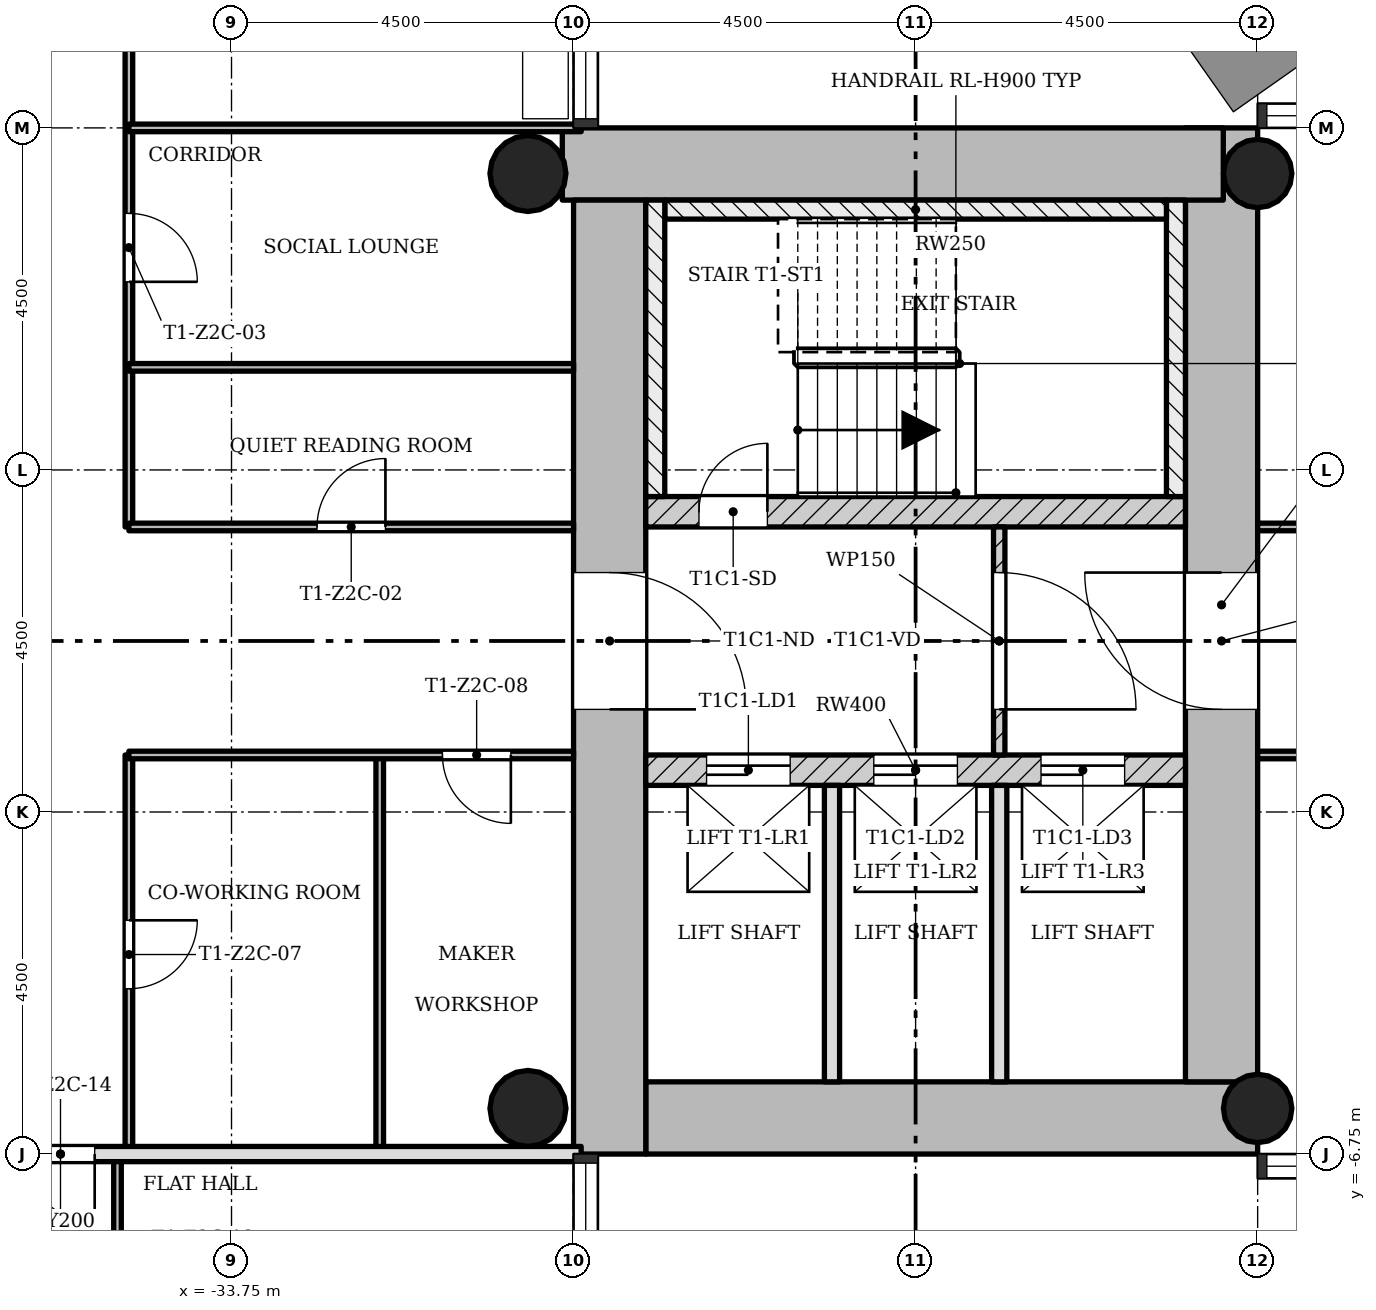
"""IFC4 building model, lengths in metres.
Left out: names, types, materials, properties, quantities, classifications, styles, units other than length and angle.
Written with IfcOpenShell. Run it as: python <this file> out.ifc"""

import sys

from ifc_helpers import new_model, si_unit, direction, frame, frame_2d, origin, origin_2d, place, context, subcontext, project, spatial, rectangle, hollow_circle, extrude, element, fill, save


model = new_model("IFC4")
c1 = context("Model", 3, precision=1e-05, world=origin(), true_north=direction((0.0, 1.0)))
c2 = subcontext(c1, "Body", "Model", "MODEL_VIEW")
j1 = project(units=[si_unit("LENGTHUNIT", "METRE"), si_unit("PLANEANGLEUNIT", "RADIAN")], contexts=[c1])
p1 = place(None, origin())
s1 = spatial("IfcSite", under=j1, at=p1, CompositionType="ELEMENT")
p2 = place(p1, origin())
s2 = spatial("IfcBuilding", under=s1, at=p2, CompositionType="ELEMENT")
p3 = place(p2, frame((0.0, 0.0, 86.8)))
s3 = spatial("IfcBuildingStorey", under=s2, at=p3, CompositionType="ELEMENT", Elevation=86.8)
p4 = place(p3, frame((-28.3, -6.275, 0.0), z_axis=(0.0, 0.0, 1.0), x_axis=(1.0, 0.0, 0.0)))
e1 = element("IfcWall", 1, at=p4, inside=s3, PredefinedType="SHEAR", context=c2, shape_type="SweptSolid", body=[
    extrude(rectangle(XDim=8.05, YDim=0.95, at=frame_2d((4.025, 0.0))), origin(), (0.0, 0.0, 1.0), 3.4),
])
p5 = place(p3, frame((-20.725, -5.8, 0.0), z_axis=(0.0, 0.0, 1.0), x_axis=(0.0, 1.0, 0.0)))
e2 = element("IfcWall", 2, at=p5, inside=s3, PredefinedType="SHEAR", context=c2, shape_type="SweptSolid", body=[
    extrude(rectangle(XDim=12.55, YDim=0.95, at=frame_2d((6.275, 0.0))), origin(), (0.0, 0.0, 1.0), 3.4),
])
p6 = place(p5, frame((4.9, 0.0, 0.0)))
e3 = element("IfcOpeningElement", 3, at=p6, cuts=e2, PredefinedType="OPENING", context=c2, shape_type="SweptSolid", body=[
    extrude(rectangle(XDim=1.8, YDim=2.1, at=frame_2d((0.9, 1.05))), frame((0.0, 0.485, 0.0), z_axis=(0.0, -1.0, 0.0), x_axis=(1.0, 0.0, 0.0)), (0.0, 0.0, 1.0), 0.97),
])
p7 = place(p3, frame((-20.702, 6.275, 0.0), z_axis=(0.0, 0.0, 1.0), x_axis=(-1.0, 0.0, 0.0)))
e4 = element("IfcWall", 4, at=p7, inside=s3, PredefinedType="SHEAR", context=c2, shape_type="SweptSolid", body=[
    extrude(rectangle(XDim=8.696, YDim=0.95, at=frame_2d((4.348, 0.0))), origin(), (0.0, 0.0, 1.0), 3.4),
])
p8 = place(p3, frame((-28.775, 5.8, 0.0), z_axis=(0.0, 0.0, 1.0), x_axis=(0.0, -1.0, 0.0)))
e5 = element("IfcWall", 5, at=p8, inside=s3, PredefinedType="SHEAR", context=c2, shape_type="SweptSolid", body=[
    extrude(rectangle(XDim=12.55, YDim=0.95, at=frame_2d((6.275, 0.0))), origin(), (0.0, 0.0, 1.0), 3.4),
])
p9 = place(p8, frame((4.9, 0.0, 0.0)))
e6 = element("IfcOpeningElement", 6, at=p9, cuts=e5, PredefinedType="OPENING", context=c2, shape_type="SweptSolid", body=[
    extrude(rectangle(XDim=1.8, YDim=2.1, at=frame_2d((0.9, 1.05))), frame((0.0, 0.485, 0.0), z_axis=(0.0, -1.0, 0.0), x_axis=(1.0, 0.0, 0.0)), (0.0, 0.0, 1.0), 0.97),
])
p10 = place(p3, frame((-28.3, -1.7, 0.0), z_axis=(0.0, 0.0, 1.0), x_axis=(1.0, 0.0, 0.0)))
e7 = element("IfcWall", 7, at=p10, inside=s3, PredefinedType="SHEAR", context=c2, shape_type="SweptSolid", body=[
    extrude(rectangle(XDim=7.1, YDim=0.4, at=frame_2d((3.55, 0.0))), origin(), (0.0, 0.0, 1.0), 3.4),
])
p11 = place(p10, frame((0.8, 0.0, 0.0)))
e8 = element("IfcOpeningElement", 8, at=p11, cuts=e7, PredefinedType="OPENING", context=c2, shape_type="SweptSolid", body=[
    extrude(rectangle(XDim=1.1, YDim=2.1, at=frame_2d((0.55, 1.05))), frame((0.0, 0.21, 0.0), z_axis=(0.0, -1.0, 0.0), x_axis=(1.0, 0.0, 0.0)), (0.0, 0.0, 1.0), 0.42),
])
p12 = place(p10, frame((3.0, 0.0, 0.0)))
e9 = element("IfcOpeningElement", 9, at=p12, cuts=e7, PredefinedType="OPENING", context=c2, shape_type="SweptSolid", body=[
    extrude(rectangle(XDim=1.1, YDim=2.1, at=frame_2d((0.55, 1.05))), frame((0.0, 0.21, 0.0), z_axis=(0.0, -1.0, 0.0), x_axis=(1.0, 0.0, 0.0)), (0.0, 0.0, 1.0), 0.42),
])
p13 = place(p10, frame((5.2, 0.0, 0.0)))
e10 = element("IfcOpeningElement", 10, at=p13, cuts=e7, PredefinedType="OPENING", context=c2, shape_type="SweptSolid", body=[
    extrude(rectangle(XDim=1.1, YDim=2.1, at=frame_2d((0.55, 1.05))), frame((0.0, 0.21, 0.0), z_axis=(0.0, -1.0, 0.0), x_axis=(1.0, 0.0, 0.0)), (0.0, 0.0, 1.0), 0.42),
])
p14 = place(p3, frame((-28.3, 1.7, 0.0), z_axis=(0.0, 0.0, 1.0), x_axis=(1.0, 0.0, 0.0)))
e11 = element("IfcWall", 11, at=p14, inside=s3, PredefinedType="SHEAR", context=c2, shape_type="SweptSolid", body=[
    extrude(rectangle(XDim=7.1, YDim=0.4, at=frame_2d((3.55, 0.0))), origin(), (0.0, 0.0, 1.0), 3.4),
])
p15 = place(p14, frame((0.7, 0.0, 0.0)))
e12 = element("IfcOpeningElement", 12, at=p15, cuts=e11, PredefinedType="OPENING", context=c2, shape_type="SweptSolid", body=[
    extrude(rectangle(XDim=0.9, YDim=2.1, at=frame_2d((0.45, 1.05))), frame((0.0, 0.21, 0.0), z_axis=(0.0, -1.0, 0.0), x_axis=(1.0, 0.0, 0.0)), (0.0, 0.0, 1.0), 0.42),
])
for number, where, z_axis, x_axis in (
    (13, (-20.25, -6.15, 0.0), (0.0, 0.0, 1.0), (1.0, 0.0, 0.0)),
    (14, (-20.25, 6.15, 0.0), (0.0, 0.0, 1.0), (1.0, 0.0, 0.0)),
):
    element("IfcColumn", number, at=place(p3, frame(where, z_axis=z_axis, x_axis=x_axis)), inside=s3, PredefinedType="COLUMN", context=c2, shape_type="SweptSolid", body=[
        extrude(hollow_circle(Radius=0.45, WallThickness=0.032, at=origin_2d()), origin(), (0.0, 0.0, 1.0), 3.4),
    ])
for number, where, z_axis, x_axis in (
    (15, (-29.85, -6.15, 0.0), (0.0, 0.0, 1.0), (1.0, 0.0, 0.0)),
    (16, (-29.85, 6.15, 0.0), (0.0, 0.0, 1.0), (1.0, 0.0, 0.0)),
):
    element("IfcColumn", number, at=place(p3, frame(where, z_axis=z_axis, x_axis=x_axis)), inside=s3, PredefinedType="COLUMN", context=c2, shape_type="SweptSolid", body=[
        extrude(hollow_circle(Radius=0.5, WallThickness=0.036, at=origin_2d()), origin(), (0.0, 0.0, 1.0), 3.4),
    ])
p16 = place(p3, frame((-23.65, -1.5, 0.0), z_axis=(0.0, 0.0, 1.0), x_axis=(0.0, 1.0, 0.0)))
e17 = element("IfcWall", 17, at=p16, inside=s3, PredefinedType="PARTITIONING", context=c2, shape_type="SweptSolid", body=[
    extrude(rectangle(XDim=3.0, YDim=0.15, at=frame_2d((1.5, 0.0))), origin(), (0.0, 0.0, 1.0), 3.0),
])
p17 = place(p16, frame((0.6, 0.0, 0.0)))
e18 = element("IfcOpeningElement", 18, at=p17, cuts=e17, PredefinedType="OPENING", context=c2, shape_type="SweptSolid", body=[
    extrude(rectangle(XDim=1.8, YDim=2.1, at=frame_2d((0.9, 1.05))), frame((0.0, 0.085, 0.0), z_axis=(0.0, -1.0, 0.0), x_axis=(1.0, 0.0, 0.0)), (0.0, 0.0, 1.0), 0.17),
])
for number, where, z_axis, x_axis in (
    (19, (-25.85, -5.8, 0.0), (0.0, 0.0, 1.0), (0.0, 1.0, 0.0)),
    (20, (-23.65, -5.8, 0.0), (0.0, 0.0, 1.0), (0.0, 1.0, 0.0)),
):
    element("IfcWall", number, at=place(p3, frame(where, z_axis=z_axis, x_axis=x_axis)), inside=s3, PredefinedType="SOLIDWALL", context=c2, shape_type="SweptSolid", body=[
        extrude(rectangle(XDim=3.9, YDim=0.2, at=frame_2d((1.95, 0.0))), origin(), (0.0, 0.0, 1.0), 3.0),
    ])
p18 = place(p3, frame((-35.25, -11.25, 0.0), z_axis=(0.0, 0.0, 1.0), x_axis=(0.0, 1.0, 0.0)))
e21 = element("IfcWall", 21, at=p18, inside=s3, PredefinedType="PARTITIONING", context=c2, shape_type="SweptSolid", body=[
    extrude(rectangle(XDim=4.5, YDim=0.1, at=frame_2d((2.25, 0.0))), origin(), (0.0, 0.0, 1.0), 3.0),
])
p19 = place(p18, frame((1.8, 0.0, 0.0)))
e22 = element("IfcOpeningElement", 22, at=p19, cuts=e21, PredefinedType="OPENING", context=c2, shape_type="SweptSolid", body=[
    extrude(rectangle(XDim=0.9, YDim=2.1, at=frame_2d((0.45, 1.05))), frame((0.0, 0.06, 0.0), z_axis=(0.0, -1.0, 0.0), x_axis=(1.0, 0.0, 0.0)), (0.0, 0.0, 1.0), 0.12),
])
p20 = place(p3, frame((-35.1, -6.75, 0.0), z_axis=(0.0, 0.0, 1.0), x_axis=(0.0, 1.0, 0.0)))
e23 = element("IfcWall", 23, at=p20, inside=s3, PredefinedType="PARTITIONING", context=c2, shape_type="SweptSolid", body=[
    extrude(rectangle(XDim=5.25, YDim=0.1, at=frame_2d((2.625, 0.0))), origin(), (0.0, 0.0, 1.0), 3.0),
])
p21 = place(p20, frame((2.175, 0.0, 0.0)))
e24 = element("IfcOpeningElement", 24, at=p21, cuts=e23, PredefinedType="OPENING", context=c2, shape_type="SweptSolid", body=[
    extrude(rectangle(XDim=0.9, YDim=2.1, at=frame_2d((0.45, 1.05))), frame((0.0, 0.06, 0.0), z_axis=(0.0, -1.0, 0.0), x_axis=(1.0, 0.0, 0.0)), (0.0, 0.0, 1.0), 0.12),
])
p22 = place(p3, frame((-35.1, 1.5, 0.0), z_axis=(0.0, 0.0, 1.0), x_axis=(0.0, 1.0, 0.0)))
e25 = element("IfcWall", 25, at=p22, inside=s3, PredefinedType="PARTITIONING", context=c2, shape_type="SweptSolid", body=[
    extrude(rectangle(XDim=9.75, YDim=0.1, at=frame_2d((4.875, 0.0))), origin(), (0.0, 0.0, 1.0), 3.0),
])
p23 = place(p22, frame((3.225, 0.0, 0.0)))
e26 = element("IfcOpeningElement", 26, at=p23, cuts=e25, PredefinedType="OPENING", context=c2, shape_type="SweptSolid", body=[
    extrude(rectangle(XDim=0.9, YDim=2.1, at=frame_2d((0.45, 1.05))), frame((0.0, 0.06, 0.0), z_axis=(0.0, -1.0, 0.0), x_axis=(1.0, 0.0, 0.0)), (0.0, 0.0, 1.0), 0.12),
])
p24 = place(p22, frame((7.05, 0.0, 0.0)))
e27 = element("IfcOpeningElement", 27, at=p24, cuts=e25, PredefinedType="OPENING", context=c2, shape_type="SweptSolid", body=[
    extrude(rectangle(XDim=0.9, YDim=2.1, at=frame_2d((0.45, 1.05))), frame((0.0, 0.06, 0.0), z_axis=(0.0, -1.0, 0.0), x_axis=(1.0, 0.0, 0.0)), (0.0, 0.0, 1.0), 0.12),
])
p25 = place(p3, frame((-31.8, -6.75, 0.0), z_axis=(0.0, 0.0, 1.0), x_axis=(0.0, 1.0, 0.0)))
e28 = element("IfcWall", 28, at=p25, inside=s3, PredefinedType="PARTITIONING", context=c2, shape_type="SweptSolid", body=[
    extrude(rectangle(XDim=5.25, YDim=0.1, at=frame_2d((2.625, 0.0))), origin(), (0.0, 0.0, 1.0), 3.0),
])
p26 = place(p3, frame((-42.85, -6.75, 0.0), z_axis=(0.0, 0.0, 1.0), x_axis=(1.0, 0.0, 0.0)))
e29 = element("IfcWall", 29, at=p26, inside=s3, PredefinedType="SOLIDWALL", context=c2, shape_type="SweptSolid", body=[
    extrude(rectangle(XDim=13.7, YDim=0.2, at=frame_2d((6.85, 0.0))), origin(), (0.0, 0.0, 1.0), 3.0),
])
p27 = place(p26, frame((6.4, 0.0, 0.0)))
e30 = element("IfcOpeningElement", 30, at=p27, cuts=e29, PredefinedType="OPENING", context=c2, shape_type="SweptSolid", body=[
    extrude(rectangle(XDim=0.9, YDim=2.1, at=frame_2d((0.45, 1.05))), frame((0.0, 0.11, 0.0), z_axis=(0.0, -1.0, 0.0), x_axis=(1.0, 0.0, 0.0)), (0.0, 0.0, 1.0), 0.22),
])
p28 = place(p3, frame((-35.1, -1.5, 0.0), z_axis=(0.0, 0.0, 1.0), x_axis=(1.0, 0.0, 0.0)))
e31 = element("IfcWall", 31, at=p28, inside=s3, PredefinedType="PARTITIONING", context=c2, shape_type="SweptSolid", body=[
    extrude(rectangle(XDim=5.85, YDim=0.1, at=frame_2d((2.925, 0.0))), origin(), (0.0, 0.0, 1.0), 3.0),
])
p29 = place(p28, frame((4.125, 0.0, 0.0)))
e32 = element("IfcOpeningElement", 32, at=p29, cuts=e31, PredefinedType="OPENING", context=c2, shape_type="SweptSolid", body=[
    extrude(rectangle(XDim=0.9, YDim=2.1, at=frame_2d((0.45, 1.05))), frame((0.0, 0.06, 0.0), z_axis=(0.0, -1.0, 0.0), x_axis=(1.0, 0.0, 0.0)), (0.0, 0.0, 1.0), 0.12),
])
p30 = place(p3, frame((-20.25, -1.5, 0.0), z_axis=(0.0, 0.0, 1.0), x_axis=(1.0, 0.0, 0.0)))
e33 = element("IfcWall", 33, at=p30, inside=s3, PredefinedType="PARTITIONING", context=c2, shape_type="SweptSolid", body=[
    extrude(rectangle(XDim=4.5, YDim=0.1, at=frame_2d((2.25, 0.0))), origin(), (0.0, 0.0, 1.0), 3.0),
])
p31 = place(p30, frame((1.8, 0.0, 0.0)))
e34 = element("IfcOpeningElement", 34, at=p31, cuts=e33, PredefinedType="OPENING", context=c2, shape_type="SweptSolid", body=[
    extrude(rectangle(XDim=0.9, YDim=2.1, at=frame_2d((0.45, 1.05))), frame((0.0, 0.06, 0.0), z_axis=(0.0, -1.0, 0.0), x_axis=(1.0, 0.0, 0.0)), (0.0, 0.0, 1.0), 0.12),
])
p32 = place(p3, frame((-35.1, 1.5, 0.0), z_axis=(0.0, 0.0, 1.0), x_axis=(1.0, 0.0, 0.0)))
e35 = element("IfcWall", 35, at=p32, inside=s3, PredefinedType="PARTITIONING", context=c2, shape_type="SweptSolid", body=[
    extrude(rectangle(XDim=5.85, YDim=0.1, at=frame_2d((2.925, 0.0))), origin(), (0.0, 0.0, 1.0), 3.0),
])
p33 = place(p32, frame((2.475, 0.0, 0.0)))
e36 = element("IfcOpeningElement", 36, at=p33, cuts=e35, PredefinedType="OPENING", context=c2, shape_type="SweptSolid", body=[
    extrude(rectangle(XDim=0.9, YDim=2.1, at=frame_2d((0.45, 1.05))), frame((0.0, 0.06, 0.0), z_axis=(0.0, -1.0, 0.0), x_axis=(1.0, 0.0, 0.0)), (0.0, 0.0, 1.0), 0.12),
])
p34 = place(p3, frame((-20.25, 1.5, 0.0), z_axis=(0.0, 0.0, 1.0), x_axis=(1.0, 0.0, 0.0)))
e37 = element("IfcWall", 37, at=p34, inside=s3, PredefinedType="PARTITIONING", context=c2, shape_type="SweptSolid", body=[
    extrude(rectangle(XDim=4.5, YDim=0.1, at=frame_2d((2.25, 0.0))), origin(), (0.0, 0.0, 1.0), 3.0),
])
p35 = place(p34, frame((1.8, 0.0, 0.0)))
e38 = element("IfcOpeningElement", 38, at=p35, cuts=e37, PredefinedType="OPENING", context=c2, shape_type="SweptSolid", body=[
    extrude(rectangle(XDim=0.9, YDim=2.1, at=frame_2d((0.45, 1.05))), frame((0.0, 0.06, 0.0), z_axis=(0.0, -1.0, 0.0), x_axis=(1.0, 0.0, 0.0)), (0.0, 0.0, 1.0), 0.12),
])
p36 = place(p3, frame((-35.1, 3.6, 0.0), z_axis=(0.0, 0.0, 1.0), x_axis=(1.0, 0.0, 0.0)))
e39 = element("IfcWall", 39, at=p36, inside=s3, PredefinedType="PARTITIONING", context=c2, shape_type="SweptSolid", body=[
    extrude(rectangle(XDim=5.85, YDim=0.1, at=frame_2d((2.925, 0.0))), origin(), (0.0, 0.0, 1.0), 3.0),
])
p37 = place(p3, frame((-35.1, 6.75, 0.0), z_axis=(0.0, 0.0, 1.0), x_axis=(1.0, 0.0, 0.0)))
e40 = element("IfcWall", 40, at=p37, inside=s3, PredefinedType="PARTITIONING", context=c2, shape_type="SweptSolid", body=[
    extrude(rectangle(XDim=5.95, YDim=0.1, at=frame_2d((2.975, 0.0))), origin(), (0.0, 0.0, 1.0), 3.0),
])
p38 = place(p3, frame((-21.325, 1.9, 0.0), z_axis=(0.0, 0.0, 1.0), x_axis=(0.0, 1.0, 0.0)))
e41 = element("IfcWall", 41, at=p38, inside=s3, PredefinedType="SHEAR", context=c2, shape_type="SweptSolid", body=[
    extrude(rectangle(XDim=3.9, YDim=0.25, at=frame_2d((1.95, 0.0))), origin(), (0.0, 0.0, 1.0), 3.4),
])
p39 = place(p3, frame((-28.05, 5.675, 0.0), z_axis=(0.0, 0.0, 1.0), x_axis=(1.0, 0.0, 0.0)))
e42 = element("IfcWall", 42, at=p39, inside=s3, PredefinedType="SHEAR", context=c2, shape_type="SweptSolid", body=[
    extrude(rectangle(XDim=6.6, YDim=0.25, at=frame_2d((3.3, 0.0))), origin(), (0.0, 0.0, 1.0), 3.4),
])
p40 = place(p3, frame((-28.175, 1.9, 0.0), z_axis=(0.0, 0.0, 1.0), x_axis=(0.0, 1.0, 0.0)))
e43 = element("IfcWall", 43, at=p40, inside=s3, PredefinedType="SHEAR", context=c2, shape_type="SweptSolid", body=[
    extrude(rectangle(XDim=3.9, YDim=0.25, at=frame_2d((1.95, 0.0))), origin(), (0.0, 0.0, 1.0), 3.4),
])
p41 = place(p17, origin())
e44 = element("IfcDoor", 44, at=p41, inside=s3, OperationType="SINGLE_SWING_LEFT", PredefinedType="DOOR", context=c2, shape_type="SweptSolid", body=[
    extrude(rectangle(XDim=1.8, YDim=2.1, at=frame_2d((0.9, 1.05))), frame((0.0, 0.025, 0.0), z_axis=(0.0, -1.0, 0.0), x_axis=(1.0, 0.0, 0.0)), (0.0, 0.0, 1.0), 0.05),
])
fill(e18, e44)
p42 = place(p33, origin())
e45 = element("IfcDoor", 45, at=p42, inside=s3, OperationType="SINGLE_SWING_LEFT", PredefinedType="DOOR", context=c2, shape_type="SweptSolid", body=[
    extrude(rectangle(XDim=0.9, YDim=2.1, at=frame_2d((0.45, 1.05))), frame((0.0, 0.025, 0.0), z_axis=(0.0, -1.0, 0.0), x_axis=(1.0, 0.0, 0.0)), (0.0, 0.0, 1.0), 0.05),
])
fill(e36, e45)
p43 = place(p23, origin())
e46 = element("IfcDoor", 46, at=p43, inside=s3, OperationType="SINGLE_SWING_LEFT", PredefinedType="DOOR", context=c2, shape_type="SweptSolid", body=[
    extrude(rectangle(XDim=0.9, YDim=2.1, at=frame_2d((0.45, 1.05))), frame((0.0, 0.025, 0.0), z_axis=(0.0, -1.0, 0.0), x_axis=(1.0, 0.0, 0.0)), (0.0, 0.0, 1.0), 0.05),
])
fill(e26, e46)
p44 = place(p21, origin())
e47 = element("IfcDoor", 47, at=p44, inside=s3, OperationType="SINGLE_SWING_RIGHT", PredefinedType="DOOR", context=c2, shape_type="SweptSolid", body=[
    extrude(rectangle(XDim=0.9, YDim=2.1, at=frame_2d((0.45, 1.05))), frame((0.0, 0.025, 0.0), z_axis=(0.0, -1.0, 0.0), x_axis=(1.0, 0.0, 0.0)), (0.0, 0.0, 1.0), 0.05),
])
fill(e24, e47)
p45 = place(p29, origin())
e48 = element("IfcDoor", 48, at=p45, inside=s3, OperationType="SINGLE_SWING_RIGHT", PredefinedType="DOOR", context=c2, shape_type="SweptSolid", body=[
    extrude(rectangle(XDim=0.9, YDim=2.1, at=frame_2d((0.45, 1.05))), frame((0.0, 0.025, 0.0), z_axis=(0.0, -1.0, 0.0), x_axis=(1.0, 0.0, 0.0)), (0.0, 0.0, 1.0), 0.05),
])
fill(e32, e48)
p46 = place(p27, origin())
e49 = element("IfcDoor", 49, at=p46, inside=s3, OperationType="SINGLE_SWING_RIGHT", PredefinedType="DOOR", context=c2, shape_type="SweptSolid", body=[
    extrude(rectangle(XDim=0.9, YDim=2.1, at=frame_2d((0.45, 1.05))), frame((0.0, 0.025, 0.0), z_axis=(0.0, -1.0, 0.0), x_axis=(1.0, 0.0, 0.0)), (0.0, 0.0, 1.0), 0.05),
])
fill(e30, e49)
p47 = place(p15, origin())
e50 = element("IfcDoor", 50, at=p47, inside=s3, OperationType="SINGLE_SWING_LEFT", PredefinedType="DOOR", context=c2, shape_type="SweptSolid", body=[
    extrude(rectangle(XDim=0.9, YDim=2.1, at=frame_2d((0.45, 1.05))), frame((0.0, 0.025, 0.0), z_axis=(0.0, -1.0, 0.0), x_axis=(1.0, 0.0, 0.0)), (0.0, 0.0, 1.0), 0.05),
])
fill(e12, e50)
p48 = place(p11, origin())
e51 = element("IfcDoor", 51, at=p48, inside=s3, OperationType="SLIDING_TO_LEFT", PredefinedType="DOOR", context=c2, shape_type="SweptSolid", body=[
    extrude(rectangle(XDim=1.1, YDim=2.1, at=frame_2d((0.55, 1.05))), frame((0.0, 0.025, 0.0), z_axis=(0.0, -1.0, 0.0), x_axis=(1.0, 0.0, 0.0)), (0.0, 0.0, 1.0), 0.05),
])
fill(e8, e51)
p49 = place(p12, origin())
e52 = element("IfcDoor", 52, at=p49, inside=s3, OperationType="SLIDING_TO_LEFT", PredefinedType="DOOR", context=c2, shape_type="SweptSolid", body=[
    extrude(rectangle(XDim=1.1, YDim=2.1, at=frame_2d((0.55, 1.05))), frame((0.0, 0.025, 0.0), z_axis=(0.0, -1.0, 0.0), x_axis=(1.0, 0.0, 0.0)), (0.0, 0.0, 1.0), 0.05),
])
fill(e9, e52)
p50 = place(p13, origin())
e53 = element("IfcDoor", 53, at=p50, inside=s3, OperationType="SLIDING_TO_LEFT", PredefinedType="DOOR", context=c2, shape_type="SweptSolid", body=[
    extrude(rectangle(XDim=1.1, YDim=2.1, at=frame_2d((0.55, 1.05))), frame((0.0, 0.025, 0.0), z_axis=(0.0, -1.0, 0.0), x_axis=(1.0, 0.0, 0.0)), (0.0, 0.0, 1.0), 0.05),
])
fill(e10, e53)
p51 = place(p9, origin())
e54 = element("IfcDoor", 54, at=p51, inside=s3, OperationType="SINGLE_SWING_LEFT", PredefinedType="DOOR", context=c2, shape_type="SweptSolid", body=[
    extrude(rectangle(XDim=1.8, YDim=2.1, at=frame_2d((0.9, 1.05))), frame((0.0, 0.025, 0.0), z_axis=(0.0, -1.0, 0.0), x_axis=(1.0, 0.0, 0.0)), (0.0, 0.0, 1.0), 0.05),
])
fill(e6, e54)
p52 = place(p6, origin())
e55 = element("IfcDoor", 55, at=p52, inside=s3, OperationType="SINGLE_SWING_LEFT", PredefinedType="DOOR", context=c2, shape_type="SweptSolid", body=[
    extrude(rectangle(XDim=1.8, YDim=2.1, at=frame_2d((0.9, 1.05))), frame((0.0, 0.025, 0.0), z_axis=(0.0, -1.0, 0.0), x_axis=(1.0, 0.0, 0.0)), (0.0, 0.0, 1.0), 0.05),
])
fill(e3, e55)
save(model, sys.argv[1])
